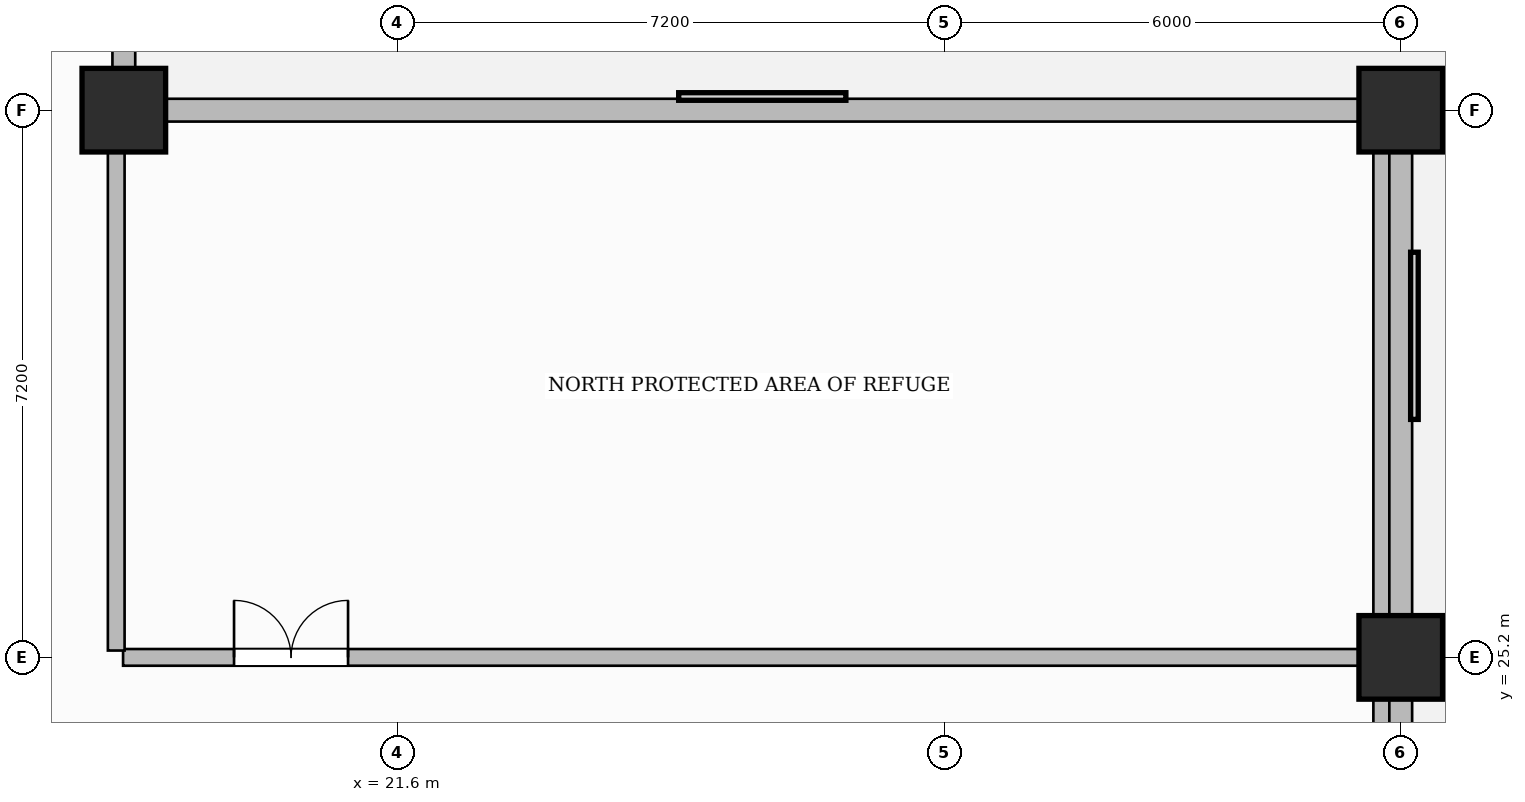
"""IFC4 building model, lengths in metres.
Left out: names, types, materials, properties, quantities, classifications, styles, units other than length and angle.
Written with IfcOpenShell. Run it as: python <this file> out.ifc"""

import sys

from ifc_helpers import new_model, si_unit, direction, frame, frame_2d, origin, origin_2d, place, context, subcontext, project, spatial, rectangle, extrude, source, transform, mapped, element, fill, save


model = new_model("IFC4")
c1 = context("Model", 3, precision=1e-05, world=origin(), true_north=direction((0.0, 1.0)))
c2 = subcontext(c1, "Body", "Model", "MODEL_VIEW")
j1 = project(units=[si_unit("LENGTHUNIT", "METRE"), si_unit("PLANEANGLEUNIT", "RADIAN")], contexts=[c1])
p1 = place(None, origin())
s1 = spatial("IfcSite", under=j1, at=p1, CompositionType="ELEMENT")
p2 = place(p1, origin())
s2 = spatial("IfcBuilding", under=s1, at=p2, CompositionType="ELEMENT")
p3 = place(p2, frame((0.0, 0.0, 27.0)))
s3 = spatial("IfcBuildingStorey", under=s2, at=p3, CompositionType="ELEMENT", Elevation=27.0)
m1 = source(origin(), c2, "Body", "SweptSolid", [
    extrude(rectangle(XDim=1.1, YDim=1.1, at=origin_2d()), origin(), (0.0, 0.0, 1.0), 5.4),
])
for number, where, z_axis, x_axis in (
    (1, (34.8, 25.2, 0.0), (0.0, 0.0, 1.0), (1.0, 0.0, 0.0)),
    (2, (34.8, 32.4, 0.0), (0.0, 0.0, 1.0), (1.0, 0.0, 0.0)),
    (3, (18.0, 32.4, 0.0), (0.0, 0.0, 1.0), (1.0, 0.0, 0.0)),
):
    element("IfcColumn", number, at=place(p3, frame(where, z_axis=z_axis, x_axis=x_axis)), inside=s3, PredefinedType="COLUMN", context=c2, shape_type="MappedRepresentation", body=[
        mapped(m1, transform((0.0, 0.0, 0.0), scale=1.0)),
    ])
p4 = place(p3, frame((17.99, 25.2, 0.0), z_axis=(0.0, 0.0, 1.0), x_axis=(1.0, 0.0, 0.0)))
e4 = element("IfcWall", 4, at=p4, inside=s3, PredefinedType="PARTITIONING", context=c2, shape_type="SweptSolid", body=[
    extrude(rectangle(XDim=16.47, YDim=0.22, at=frame_2d((8.235, 0.0))), origin(), (0.0, 0.0, 1.0), 5.15),
])
p5 = place(p4, frame((1.46, 0.0, 0.0)))
e5 = element("IfcOpeningElement", 5, at=p5, cuts=e4, PredefinedType="OPENING", context=c2, shape_type="SweptSolid", body=[
    extrude(rectangle(XDim=1.5, YDim=2.2, at=frame_2d((0.75, 1.1))), frame((0.0, 0.12, 0.0), z_axis=(0.0, -1.0, 0.0), x_axis=(1.0, 0.0, 0.0)), (0.0, 0.0, 1.0), 0.24),
])
p6 = place(p3, frame((34.55, 21.69, 0.0), z_axis=(0.0, 0.0, 1.0), x_axis=(0.0, 1.0, 0.0)))
e6 = element("IfcWall", 6, at=p6, inside=s3, PredefinedType="PARTITIONING", context=c2, shape_type="SweptSolid", body=[
    extrude(rectangle(XDim=10.47, YDim=0.22, at=frame_2d((5.235, 0.0))), origin(), (0.0, 0.0, 1.0), 4.485),
])
p7 = place(p3, frame((17.9, 25.29, 0.0), z_axis=(0.0, 0.0, 1.0), x_axis=(0.0, 1.0, 0.0)))
e7 = element("IfcWall", 7, at=p7, inside=s3, PredefinedType="PARTITIONING", context=c2, shape_type="SweptSolid", body=[
    extrude(rectangle(XDim=6.87, YDim=0.22, at=frame_2d((3.435, 0.0))), origin(), (0.0, 0.0, 1.0), 5.15),
])
p8 = place(p3, frame((18.0, 32.4, 0.0), z_axis=(0.0, 0.0, 1.0), x_axis=(0.0, 1.0, 0.0)))
e8 = element("IfcWall", 8, at=p8, inside=s3, PredefinedType="SOLIDWALL", context=c2, shape_type="SweptSolid", body=[
    extrude(rectangle(XDim=14.35, YDim=0.3, at=frame_2d((7.175, 0.0))), origin(), (0.0, 0.0, 1.0), 5.15),
])
p9 = place(p3, frame((18.0, 32.4, 0.0), z_axis=(0.0, 0.0, 1.0), x_axis=(1.0, 0.0, 0.0)))
e9 = element("IfcWall", 9, at=p9, inside=s3, PredefinedType="SOLIDWALL", context=c2, shape_type="SweptSolid", body=[
    extrude(rectangle(XDim=16.8, YDim=0.3, at=frame_2d((8.4, 0.0))), origin(), (0.0, 0.0, 1.0), 5.15),
])
p10 = place(p3, frame((34.8, 21.65, 0.0), z_axis=(0.0, 0.0, 1.0), x_axis=(0.0, 1.0, 0.0)))
e10 = element("IfcWall", 10, at=p10, inside=s3, PredefinedType="SOLIDWALL", context=c2, shape_type="SweptSolid", body=[
    extrude(rectangle(XDim=10.75, YDim=0.3, at=frame_2d((5.375, 0.0))), origin(), (0.0, 0.0, 1.0), 4.485),
])
m2 = source(origin(), c2, "Body", "SweptSolid", [
    extrude(rectangle(XDim=1.5, YDim=2.2, at=frame_2d((0.75, 1.1))), frame((0.0, 0.025, 0.0), z_axis=(0.0, -1.0, 0.0), x_axis=(1.0, 0.0, 0.0)), (0.0, 0.0, 1.0), 0.05),
])
p11 = place(p5, origin())
e11 = element("IfcDoor", 11, at=p11, inside=s3, OperationType="DOUBLE_DOOR_SINGLE_SWING", PredefinedType="DOOR", context=c2, shape_type="MappedRepresentation", body=[
    mapped(m2, transform((0.0, 0.0, 0.0), scale=1.0)),
])
fill(e5, e11)
save(model, sys.argv[1])
